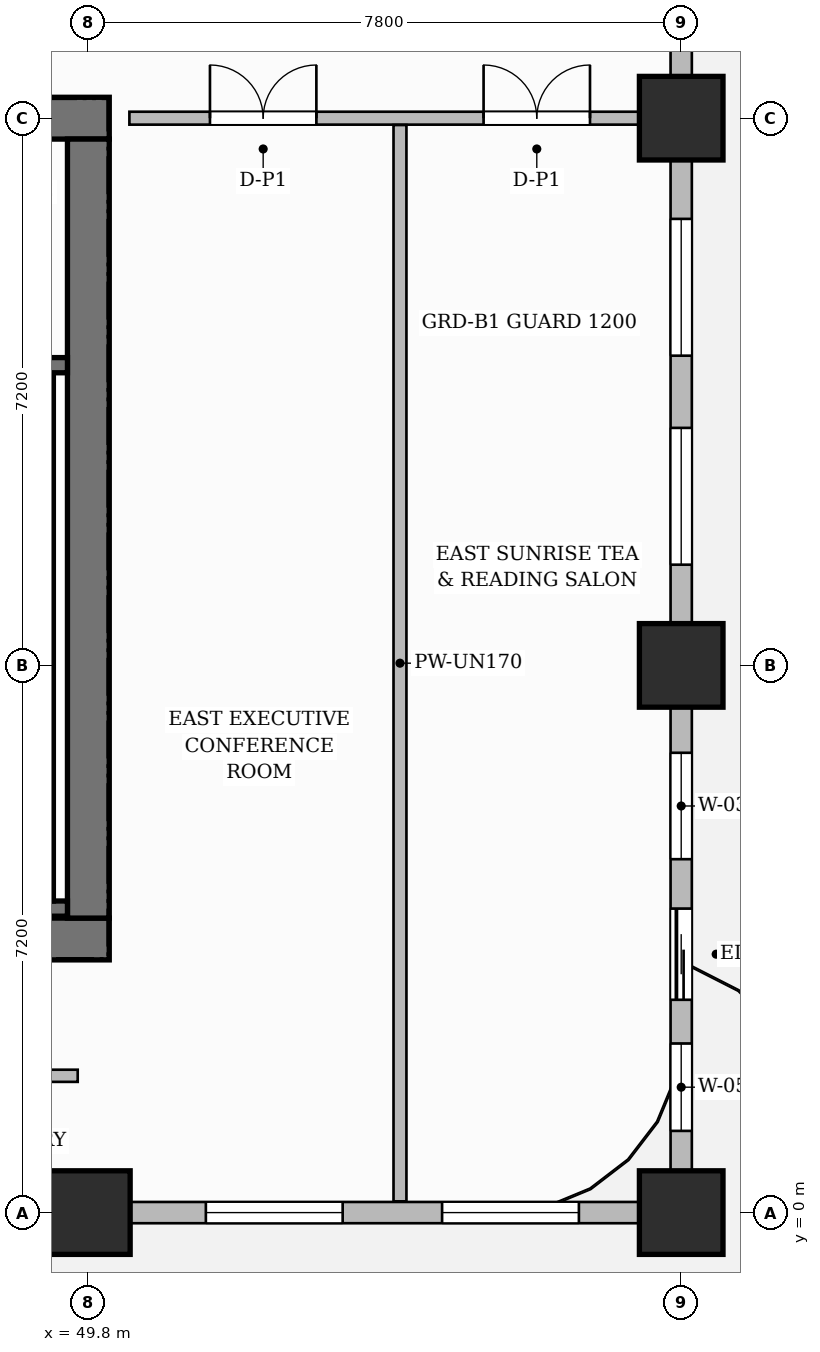
"""IFC4 building model, lengths in metres.
Left out: names, types, materials, properties, quantities, classifications, styles, units other than length and angle.
Written with IfcOpenShell. Run it as: python <this file> out.ifc"""

import sys

from ifc_helpers import new_model, si_unit, direction, frame, frame_2d, origin, origin_2d, place, context, subcontext, project, spatial, rectangle, extrude, source, transform, mapped, element, fill, save


model = new_model("IFC4")
c1 = context("Model", 3, precision=1e-05, world=origin(), true_north=direction((0.0, 1.0)))
c2 = subcontext(c1, "Body", "Model", "MODEL_VIEW")
j1 = project(units=[si_unit("LENGTHUNIT", "METRE"), si_unit("PLANEANGLEUNIT", "RADIAN")], contexts=[c1])
p1 = place(None, origin())
s1 = spatial("IfcSite", under=j1, at=p1, CompositionType="ELEMENT")
p2 = place(p1, origin())
s2 = spatial("IfcBuilding", under=s1, at=p2, CompositionType="ELEMENT")
p3 = place(p2, frame((0.0, 0.0, 95.3)))
s3 = spatial("IfcBuildingStorey", under=s2, at=p3, CompositionType="ELEMENT", Elevation=95.3)
p4 = place(p3, frame((34.525, 3.6, 0.0), z_axis=(0.0, 0.0, 1.0), x_axis=(1.0, 0.0, 0.0)))
e1 = element("IfcWall", 1, at=p4, inside=s3, PredefinedType="SHEAR", context=c2, shape_type="SweptSolid", body=[
    extrude(rectangle(XDim=15.55, YDim=0.55, at=frame_2d((7.775, 0.0))), origin(), (0.0, 0.0, 1.0), 3.7),
])
p5 = place(p4, frame((4.105, 0.0, 0.0)))
e2 = element("IfcOpeningElement", 2, at=p5, cuts=e1, PredefinedType="OPENING", context=c2, shape_type="SweptSolid", body=[
    extrude(rectangle(XDim=0.9, YDim=2.1, at=frame_2d((0.45, 1.05))), frame((0.0, 0.285, 0.0), z_axis=(0.0, -1.0, 0.0), x_axis=(1.0, 0.0, 0.0)), (0.0, 0.0, 1.0), 0.57),
])
p6 = place(p4, frame((5.675, 0.0, 0.0)))
e3 = element("IfcOpeningElement", 3, at=p6, cuts=e1, PredefinedType="OPENING", context=c2, shape_type="SweptSolid", body=[
    extrude(rectangle(XDim=0.9, YDim=2.1, at=frame_2d((0.45, 1.05))), frame((0.0, 0.285, 0.0), z_axis=(0.0, -1.0, 0.0), x_axis=(1.0, 0.0, 0.0)), (0.0, 0.0, 1.0), 0.57),
])
p7 = place(p4, frame((7.275, 0.0, 0.0)))
e4 = element("IfcOpeningElement", 4, at=p7, cuts=e1, PredefinedType="OPENING", context=c2, shape_type="SweptSolid", body=[
    extrude(rectangle(XDim=0.9, YDim=2.1, at=frame_2d((0.45, 1.05))), frame((0.0, 0.285, 0.0), z_axis=(0.0, -1.0, 0.0), x_axis=(1.0, 0.0, 0.0)), (0.0, 0.0, 1.0), 0.57),
])
p8 = place(p3, frame((34.525, 14.4, 0.0), z_axis=(0.0, 0.0, 1.0), x_axis=(1.0, 0.0, 0.0)))
e5 = element("IfcWall", 5, at=p8, inside=s3, PredefinedType="SHEAR", context=c2, shape_type="SweptSolid", body=[
    extrude(rectangle(XDim=15.55, YDim=0.55, at=frame_2d((7.775, 0.0))), origin(), (0.0, 0.0, 1.0), 3.7),
])
p9 = place(p8, frame((5.405, 0.0, 0.0)))
e6 = element("IfcOpeningElement", 6, at=p9, cuts=e5, PredefinedType="OPENING", context=c2, shape_type="SweptSolid", body=[
    extrude(rectangle(XDim=1.5, YDim=2.2, at=frame_2d((0.75, 1.1))), frame((0.0, 0.285, 0.0), z_axis=(0.0, -1.0, 0.0), x_axis=(1.0, 0.0, 0.0)), (0.0, 0.0, 1.0), 0.57),
])
p10 = place(p8, frame((1.62, 0.0, 0.0)))
e7 = element("IfcOpeningElement", 7, at=p10, cuts=e5, PredefinedType="OPENING", context=c2, shape_type="SweptSolid", body=[
    extrude(rectangle(XDim=1.05, YDim=2.15, at=frame_2d((0.525, 1.075))), frame((0.0, 0.285, 0.0), z_axis=(0.0, -1.0, 0.0), x_axis=(1.0, 0.0, 0.0)), (0.0, 0.0, 1.0), 0.57),
])
p11 = place(p8, frame((11.25, 0.0, 0.0)))
e8 = element("IfcOpeningElement", 8, at=p11, cuts=e5, PredefinedType="OPENING", context=c2, shape_type="SweptSolid", body=[
    extrude(rectangle(XDim=1.05, YDim=2.15, at=frame_2d((0.525, 1.075))), frame((0.0, 0.285, 0.0), z_axis=(0.0, -1.0, 0.0), x_axis=(1.0, 0.0, 0.0)), (0.0, 0.0, 1.0), 0.57),
])
p12 = place(p3, frame((49.8, 3.875, 0.0), z_axis=(0.0, 0.0, 1.0), x_axis=(0.0, 1.0, 0.0)))
e9 = element("IfcWall", 9, at=p12, inside=s3, PredefinedType="SHEAR", context=c2, shape_type="SweptSolid", body=[
    extrude(rectangle(XDim=10.25, YDim=0.55, at=frame_2d((5.125, 0.0))), origin(), (0.0, 0.0, 1.0), 3.7),
])
m1 = source(origin(), c2, "Body", "SweptSolid", [
    extrude(rectangle(XDim=1.1, YDim=1.1, at=origin_2d()), origin(), (0.0, 0.0, 1.0), 3.7),
])
for number, where, z_axis, x_axis in (
    (10, (49.8, 0.0, 0.0), (0.0, 0.0, 1.0), (1.0, 0.0, 0.0)),
    (11, (57.6, 0.0, 0.0), (0.0, 0.0, 1.0), (1.0, 0.0, 0.0)),
    (12, (57.6, 7.2, 0.0), (0.0, 0.0, 1.0), (1.0, 0.0, 0.0)),
    (13, (57.6, 14.4, 0.0), (0.0, 0.0, 1.0), (1.0, 0.0, 0.0)),
):
    element("IfcColumn", number, at=place(p3, frame(where, z_axis=z_axis, x_axis=x_axis)), inside=s3, PredefinedType="COLUMN", context=c2, shape_type="MappedRepresentation", body=[
        mapped(m1, transform((0.0, 0.0, 0.0), scale=1.0)),
    ])
p13 = place(p3, frame((43.12, 4.0, 0.0), z_axis=(0.0, 0.0, 1.0), x_axis=(1.0, 0.0, 0.0)))
e14 = element("IfcWall", 14, at=p13, inside=s3, PredefinedType="SHEAR", context=c2, shape_type="SweptSolid", body=[
    extrude(rectangle(XDim=6.405, YDim=0.2, at=frame_2d((3.202, 0.0))), origin(), (0.0, 0.0, 1.0), 3.7),
])
p14 = place(p3, frame((49.24, 4.1, 0.0), z_axis=(0.0, 0.0, 1.0), x_axis=(0.0, 1.0, 0.0)))
e15 = element("IfcWall", 15, at=p14, inside=s3, PredefinedType="SHEAR", context=c2, shape_type="SweptSolid", body=[
    extrude(rectangle(XDim=6.95, YDim=0.2, at=frame_2d((3.475, 0.0))), origin(), (0.0, 0.0, 1.0), 3.7),
])
p15 = place(p3, frame((43.12, 11.15, 0.0), z_axis=(0.0, 0.0, 1.0), x_axis=(1.0, 0.0, 0.0)))
e16 = element("IfcWall", 16, at=p15, inside=s3, PredefinedType="SHEAR", context=c2, shape_type="SweptSolid", body=[
    extrude(rectangle(XDim=6.405, YDim=0.2, at=frame_2d((3.202, 0.0))), origin(), (0.0, 0.0, 1.0), 3.7),
])
p16 = place(p15, frame((1.045, 0.0, 0.0)))
e17 = element("IfcOpeningElement", 17, at=p16, cuts=e16, PredefinedType="OPENING", context=c2, shape_type="SweptSolid", body=[
    extrude(rectangle(XDim=1.05, YDim=2.2, at=frame_2d((0.525, 1.1))), frame((0.0, 0.11, 0.0), z_axis=(0.0, -1.0, 0.0), x_axis=(1.0, 0.0, 0.0)), (0.0, 0.0, 1.0), 0.22),
])
p17 = place(p15, frame((4.125, 0.0, 0.0)))
e18 = element("IfcOpeningElement", 18, at=p17, cuts=e16, PredefinedType="OPENING", context=c2, shape_type="SweptSolid", body=[
    extrude(rectangle(XDim=1.05, YDim=2.2, at=frame_2d((0.525, 1.1))), frame((0.0, 0.11, 0.0), z_axis=(0.0, -1.0, 0.0), x_axis=(1.0, 0.0, 0.0)), (0.0, 0.0, 1.0), 0.22),
])
p18 = place(p3, frame((30.29, 1.8, 0.0), z_axis=(0.0, 0.0, 1.0), x_axis=(1.0, 0.0, 0.0)))
e19 = element("IfcWall", 19, at=p18, inside=s3, PredefinedType="PARTITIONING", context=c2, shape_type="SweptSolid", body=[
    extrude(rectangle(XDim=19.37, YDim=0.16, at=frame_2d((9.685, 0.0))), origin(), (0.0, 0.0, 1.0), 3.45),
])
p19 = place(p18, frame((5.213, 0.0, 0.0)))
e20 = element("IfcOpeningElement", 20, at=p19, cuts=e19, PredefinedType="OPENING", context=c2, shape_type="SweptSolid", body=[
    extrude(rectangle(XDim=0.9, YDim=2.15, at=frame_2d((0.45, 1.075))), frame((0.0, 0.09, 0.0), z_axis=(0.0, -1.0, 0.0), x_axis=(1.0, 0.0, 0.0)), (0.0, 0.0, 1.0), 0.18),
])
p20 = place(p18, frame((14.06, 0.0, 0.0)))
e21 = element("IfcOpeningElement", 21, at=p20, cuts=e19, PredefinedType="OPENING", context=c2, shape_type="SweptSolid", body=[
    extrude(rectangle(XDim=0.9, YDim=2.15, at=frame_2d((0.45, 1.075))), frame((0.0, 0.09, 0.0), z_axis=(0.0, -1.0, 0.0), x_axis=(1.0, 0.0, 0.0)), (0.0, 0.0, 1.0), 0.18),
])
p21 = place(p3, frame((50.34, 14.4, 0.0), z_axis=(0.0, 0.0, 1.0), x_axis=(1.0, 0.0, 0.0)))
e22 = element("IfcWall", 22, at=p21, inside=s3, PredefinedType="PARTITIONING", context=c2, shape_type="SweptSolid", body=[
    extrude(rectangle(XDim=7.07, YDim=0.17, at=frame_2d((3.535, 0.0))), origin(), (0.0, 0.0, 1.0), 2.885),
])
p22 = place(p21, frame((1.06, 0.0, 0.0)))
e23 = element("IfcOpeningElement", 23, at=p22, cuts=e22, PredefinedType="OPENING", context=c2, shape_type="SweptSolid", body=[
    extrude(rectangle(XDim=1.4, YDim=2.35, at=frame_2d((0.7, 1.175))), frame((0.0, 0.095, 0.0), z_axis=(0.0, -1.0, 0.0), x_axis=(1.0, 0.0, 0.0)), (0.0, 0.0, 1.0), 0.19),
])
p23 = place(p21, frame((4.66, 0.0, 0.0)))
e24 = element("IfcOpeningElement", 24, at=p23, cuts=e22, PredefinedType="OPENING", context=c2, shape_type="SweptSolid", body=[
    extrude(rectangle(XDim=1.4, YDim=2.35, at=frame_2d((0.7, 1.175))), frame((0.0, 0.095, 0.0), z_axis=(0.0, -1.0, 0.0), x_axis=(1.0, 0.0, 0.0)), (0.0, 0.0, 1.0), 0.19),
])
p24 = place(p3, frame((53.9, 0.148, 0.0), z_axis=(0.0, 0.0, 1.0), x_axis=(0.0, 1.0, 0.0)))
e25 = element("IfcWall", 25, at=p24, inside=s3, PredefinedType="PARTITIONING", context=c2, shape_type="SweptSolid", body=[
    extrude(rectangle(XDim=14.162, YDim=0.17, at=frame_2d((7.081, 0.0))), origin(), (0.0, 0.0, 1.0), 3.075),
])
p25 = place(p3, frame((14.4, 0.0, 0.0), z_axis=(0.0, 0.0, 1.0), x_axis=(1.0, 0.0, 0.0)))
e26 = element("IfcWall", 26, at=p25, inside=s3, PredefinedType="SOLIDWALL", context=c2, shape_type="SweptSolid", body=[
    extrude(rectangle(XDim=43.2, YDim=0.28, at=frame_2d((21.6, 0.0))), origin(), (0.0, 0.0, 1.0), 2.885),
])
p26 = place(p25, frame((0.85, 0.0, 0.0)))
e27 = element("IfcOpeningElement", 27, at=p26, cuts=e26, PredefinedType="OPENING", context=c2, shape_type="SweptSolid", body=[
    extrude(rectangle(XDim=1.2, YDim=2.2, at=frame_2d((0.6, 1.1))), frame((0.0, 0.15, 0.0), z_axis=(0.0, -1.0, 0.0), x_axis=(1.0, 0.0, 0.0)), (0.0, 0.0, 1.0), 0.3),
])
p27 = place(p25, frame((2.746, 0.0, 0.8)))
e28 = element("IfcOpeningElement", 28, at=p27, cuts=e26, PredefinedType="OPENING", context=c2, shape_type="SweptSolid", body=[
    extrude(rectangle(XDim=1.15, YDim=1.8, at=frame_2d((0.575, 0.9))), frame((0.0, 0.15, 0.0), z_axis=(0.0, -1.0, 0.0), x_axis=(1.0, 0.0, 0.0)), (0.0, 0.0, 1.0), 0.3),
])
p28 = place(p25, frame((4.654, 0.0, 0.8)))
e29 = element("IfcOpeningElement", 29, at=p28, cuts=e26, PredefinedType="OPENING", context=c2, shape_type="SweptSolid", body=[
    extrude(rectangle(XDim=1.4, YDim=1.85, at=frame_2d((0.7, 0.925))), frame((0.0, 0.15, 0.0), z_axis=(0.0, -1.0, 0.0), x_axis=(1.0, 0.0, 0.0)), (0.0, 0.0, 1.0), 0.3),
])
p29 = place(p25, frame((8.181, 0.0, 0.8)))
e30 = element("IfcOpeningElement", 30, at=p29, cuts=e26, PredefinedType="OPENING", context=c2, shape_type="SweptSolid", body=[
    extrude(rectangle(XDim=0.95, YDim=1.75, at=frame_2d((0.475, 0.875))), frame((0.0, 0.15, 0.0), z_axis=(0.0, -1.0, 0.0), x_axis=(1.0, 0.0, 0.0)), (0.0, 0.0, 1.0), 0.3),
])
p30 = place(p25, frame((10.564, 0.0, 0.8)))
e31 = element("IfcOpeningElement", 31, at=p30, cuts=e26, PredefinedType="OPENING", context=c2, shape_type="SweptSolid", body=[
    extrude(rectangle(XDim=1.8, YDim=1.85, at=frame_2d((0.9, 0.925))), frame((0.0, 0.15, 0.0), z_axis=(0.0, -1.0, 0.0), x_axis=(1.0, 0.0, 0.0)), (0.0, 0.0, 1.0), 0.3),
])
p31 = place(p25, frame((16.804, 0.0, 0.8)))
e32 = element("IfcOpeningElement", 32, at=p31, cuts=e26, PredefinedType="OPENING", context=c2, shape_type="SweptSolid", body=[
    extrude(rectangle(XDim=1.8, YDim=1.85, at=frame_2d((0.9, 0.925))), frame((0.0, 0.15, 0.0), z_axis=(0.0, -1.0, 0.0), x_axis=(1.0, 0.0, 0.0)), (0.0, 0.0, 1.0), 0.3),
])
p32 = place(p25, frame((22.396, 0.0, 0.8)))
e33 = element("IfcOpeningElement", 33, at=p32, cuts=e26, PredefinedType="OPENING", context=c2, shape_type="SweptSolid", body=[
    extrude(rectangle(XDim=1.8, YDim=1.85, at=frame_2d((0.9, 0.925))), frame((0.0, 0.15, 0.0), z_axis=(0.0, -1.0, 0.0), x_axis=(1.0, 0.0, 0.0)), (0.0, 0.0, 1.0), 0.3),
])
p33 = place(p25, frame((25.629, 0.0, 0.8)))
e34 = element("IfcOpeningElement", 34, at=p33, cuts=e26, PredefinedType="OPENING", context=c2, shape_type="SweptSolid", body=[
    extrude(rectangle(XDim=0.95, YDim=1.75, at=frame_2d((0.475, 0.875))), frame((0.0, 0.15, 0.0), z_axis=(0.0, -1.0, 0.0), x_axis=(1.0, 0.0, 0.0)), (0.0, 0.0, 1.0), 0.3),
])
p34 = place(p25, frame((29.075, 0.0, 0.8)))
e35 = element("IfcOpeningElement", 35, at=p34, cuts=e26, PredefinedType="OPENING", context=c2, shape_type="SweptSolid", body=[
    extrude(rectangle(XDim=1.8, YDim=1.85, at=frame_2d((0.9, 0.925))), frame((0.0, 0.15, 0.0), z_axis=(0.0, -1.0, 0.0), x_axis=(1.0, 0.0, 0.0)), (0.0, 0.0, 1.0), 0.3),
])
p35 = place(p25, frame((32.125, 0.0, 0.8)))
e36 = element("IfcOpeningElement", 36, at=p35, cuts=e26, PredefinedType="OPENING", context=c2, shape_type="SweptSolid", body=[
    extrude(rectangle(XDim=1.8, YDim=1.85, at=frame_2d((0.9, 0.925))), frame((0.0, 0.15, 0.0), z_axis=(0.0, -1.0, 0.0), x_axis=(1.0, 0.0, 0.0)), (0.0, 0.0, 1.0), 0.3),
])
p36 = place(p25, frame((36.946, 0.0, 0.8)))
e37 = element("IfcOpeningElement", 37, at=p36, cuts=e26, PredefinedType="OPENING", context=c2, shape_type="SweptSolid", body=[
    extrude(rectangle(XDim=1.8, YDim=1.85, at=frame_2d((0.9, 0.925))), frame((0.0, 0.15, 0.0), z_axis=(0.0, -1.0, 0.0), x_axis=(1.0, 0.0, 0.0)), (0.0, 0.0, 1.0), 0.3),
])
p37 = place(p25, frame((40.054, 0.0, 0.8)))
e38 = element("IfcOpeningElement", 38, at=p37, cuts=e26, PredefinedType="OPENING", context=c2, shape_type="SweptSolid", body=[
    extrude(rectangle(XDim=1.8, YDim=1.85, at=frame_2d((0.9, 0.925))), frame((0.0, 0.15, 0.0), z_axis=(0.0, -1.0, 0.0), x_axis=(1.0, 0.0, 0.0)), (0.0, 0.0, 1.0), 0.3),
])
p38 = place(p3, frame((57.6, 0.05, 0.0), z_axis=(0.0, 0.0, 1.0), x_axis=(0.0, 1.0, 0.0)))
e39 = element("IfcWall", 39, at=p38, inside=s3, PredefinedType="SOLIDWALL", context=c2, shape_type="SweptSolid", body=[
    extrude(rectangle(XDim=21.5, YDim=0.28, at=frame_2d((10.75, 0.0))), origin(), (0.0, 0.0, 1.0), 2.885),
])
p39 = place(p38, frame((2.75, 0.0, 0.0)))
e40 = element("IfcOpeningElement", 40, at=p39, cuts=e39, PredefinedType="OPENING", context=c2, shape_type="SweptSolid", body=[
    extrude(rectangle(XDim=1.2, YDim=2.2, at=frame_2d((0.6, 1.1))), frame((0.0, 0.15, 0.0), z_axis=(0.0, -1.0, 0.0), x_axis=(1.0, 0.0, 0.0)), (0.0, 0.0, 1.0), 0.3),
])
p40 = place(p38, frame((1.025, 0.0, 0.8)))
e41 = element("IfcOpeningElement", 41, at=p40, cuts=e39, PredefinedType="OPENING", context=c2, shape_type="SweptSolid", body=[
    extrude(rectangle(XDim=1.15, YDim=1.8, at=frame_2d((0.575, 0.9))), frame((0.0, 0.15, 0.0), z_axis=(0.0, -1.0, 0.0), x_axis=(1.0, 0.0, 0.0)), (0.0, 0.0, 1.0), 0.3),
])
p41 = place(p38, frame((4.6, 0.0, 0.8)))
e42 = element("IfcOpeningElement", 42, at=p41, cuts=e39, PredefinedType="OPENING", context=c2, shape_type="SweptSolid", body=[
    extrude(rectangle(XDim=1.4, YDim=1.85, at=frame_2d((0.7, 0.925))), frame((0.0, 0.15, 0.0), z_axis=(0.0, -1.0, 0.0), x_axis=(1.0, 0.0, 0.0)), (0.0, 0.0, 1.0), 0.3),
])
p42 = place(p38, frame((8.475, 0.0, 0.8)))
e43 = element("IfcOpeningElement", 43, at=p42, cuts=e39, PredefinedType="OPENING", context=c2, shape_type="SweptSolid", body=[
    extrude(rectangle(XDim=1.8, YDim=1.85, at=frame_2d((0.9, 0.925))), frame((0.0, 0.15, 0.0), z_axis=(0.0, -1.0, 0.0), x_axis=(1.0, 0.0, 0.0)), (0.0, 0.0, 1.0), 0.3),
])
p43 = place(p38, frame((11.225, 0.0, 0.8)))
e44 = element("IfcOpeningElement", 44, at=p43, cuts=e39, PredefinedType="OPENING", context=c2, shape_type="SweptSolid", body=[
    extrude(rectangle(XDim=1.8, YDim=1.85, at=frame_2d((0.9, 0.925))), frame((0.0, 0.15, 0.0), z_axis=(0.0, -1.0, 0.0), x_axis=(1.0, 0.0, 0.0)), (0.0, 0.0, 1.0), 0.3),
])
p44 = place(p38, frame((15.471, 0.0, 0.8)))
e45 = element("IfcOpeningElement", 45, at=p44, cuts=e39, PredefinedType="OPENING", context=c2, shape_type="SweptSolid", body=[
    extrude(rectangle(XDim=1.15, YDim=1.8, at=frame_2d((0.575, 0.9))), frame((0.0, 0.15, 0.0), z_axis=(0.0, -1.0, 0.0), x_axis=(1.0, 0.0, 0.0)), (0.0, 0.0, 1.0), 0.3),
])
p45 = place(p38, frame((17.954, 0.0, 0.8)))
e46 = element("IfcOpeningElement", 46, at=p45, cuts=e39, PredefinedType="OPENING", context=c2, shape_type="SweptSolid", body=[
    extrude(rectangle(XDim=1.8, YDim=1.85, at=frame_2d((0.9, 0.925))), frame((0.0, 0.15, 0.0), z_axis=(0.0, -1.0, 0.0), x_axis=(1.0, 0.0, 0.0)), (0.0, 0.0, 1.0), 0.3),
])
m2 = source(origin(), c2, "Body", "SweptSolid", [
    extrude(rectangle(XDim=1.4, YDim=2.35, at=frame_2d((0.7, 1.175))), frame((0.0, 0.025, 0.0), z_axis=(0.0, -1.0, 0.0), x_axis=(1.0, 0.0, 0.0)), (0.0, 0.0, 1.0), 0.05),
])
p46 = place(p22, origin())
e47 = element("IfcDoor", 47, at=p46, inside=s3, OperationType="DOUBLE_DOOR_SINGLE_SWING", PredefinedType="DOOR", context=c2, shape_type="MappedRepresentation", body=[
    mapped(m2, transform((0.0, 0.0, 0.0), scale=1.0)),
])
fill(e23, e47)
p47 = place(p23, origin())
e48 = element("IfcDoor", 48, at=p47, inside=s3, OperationType="DOUBLE_DOOR_SINGLE_SWING", PredefinedType="DOOR", context=c2, shape_type="MappedRepresentation", body=[
    mapped(m2, transform((0.0, 0.0, 0.0), scale=1.0)),
])
fill(e24, e48)
m3 = source(origin(), c2, "Body", "SweptSolid", [
    extrude(rectangle(XDim=1.2, YDim=2.2, at=frame_2d((0.6, 1.1))), frame((0.0, 0.025, 0.0), z_axis=(0.0, -1.0, 0.0), x_axis=(1.0, 0.0, 0.0)), (0.0, 0.0, 1.0), 0.05),
])
p48 = place(p39, origin())
e49 = element("IfcDoor", 49, at=p48, inside=s3, OperationType="SLIDING_TO_LEFT", PredefinedType="DOOR", context=c2, shape_type="MappedRepresentation", body=[
    mapped(m3, transform((0.0, 0.0, 0.0), scale=1.0)),
])
fill(e40, e49)
m4 = source(origin(), c2, "Body", "SweptSolid", [
    extrude(rectangle(XDim=1.8, YDim=1.85, at=frame_2d((0.9, 0.925))), frame((0.0, 0.03, 0.0), z_axis=(0.0, -1.0, 0.0), x_axis=(1.0, 0.0, 0.0)), (0.0, 0.0, 1.0), 0.06),
])
p49 = place(p36, origin())
e50 = element("IfcWindow", 50, at=p49, inside=s3, PartitioningType="DOUBLE_PANEL_VERTICAL", PredefinedType="WINDOW", context=c2, shape_type="MappedRepresentation", body=[
    mapped(m4, transform((0.0, 0.0, 0.0), scale=1.0)),
])
fill(e37, e50)
p50 = place(p37, origin())
e51 = element("IfcWindow", 51, at=p50, inside=s3, PartitioningType="DOUBLE_PANEL_VERTICAL", PredefinedType="WINDOW", context=c2, shape_type="MappedRepresentation", body=[
    mapped(m4, transform((0.0, 0.0, 0.0), scale=1.0)),
])
fill(e38, e51)
m5 = source(origin(), c2, "Body", "SweptSolid", [
    extrude(rectangle(XDim=1.15, YDim=1.8, at=frame_2d((0.575, 0.9))), frame((0.0, 0.03, 0.0), z_axis=(0.0, -1.0, 0.0), x_axis=(1.0, 0.0, 0.0)), (0.0, 0.0, 1.0), 0.06),
])
p51 = place(p40, origin())
e52 = element("IfcWindow", 52, at=p51, inside=s3, PartitioningType="SINGLE_PANEL", PredefinedType="WINDOW", context=c2, shape_type="MappedRepresentation", body=[
    mapped(m5, transform((0.0, 0.0, 0.0), scale=1.0)),
])
fill(e41, e52)
m6 = source(origin(), c2, "Body", "SweptSolid", [
    extrude(rectangle(XDim=1.4, YDim=1.85, at=frame_2d((0.7, 0.925))), frame((0.0, 0.03, 0.0), z_axis=(0.0, -1.0, 0.0), x_axis=(1.0, 0.0, 0.0)), (0.0, 0.0, 1.0), 0.06),
])
p52 = place(p41, origin())
e53 = element("IfcWindow", 53, at=p52, inside=s3, PartitioningType="SINGLE_PANEL", PredefinedType="WINDOW", context=c2, shape_type="MappedRepresentation", body=[
    mapped(m6, transform((0.0, 0.0, 0.0), scale=1.0)),
])
fill(e42, e53)
p53 = place(p42, origin())
e54 = element("IfcWindow", 54, at=p53, inside=s3, PartitioningType="DOUBLE_PANEL_VERTICAL", PredefinedType="WINDOW", context=c2, shape_type="MappedRepresentation", body=[
    mapped(m4, transform((0.0, 0.0, 0.0), scale=1.0)),
])
fill(e43, e54)
p54 = place(p43, origin())
e55 = element("IfcWindow", 55, at=p54, inside=s3, PartitioningType="DOUBLE_PANEL_VERTICAL", PredefinedType="WINDOW", context=c2, shape_type="MappedRepresentation", body=[
    mapped(m4, transform((0.0, 0.0, 0.0), scale=1.0)),
])
fill(e44, e55)
save(model, sys.argv[1])
